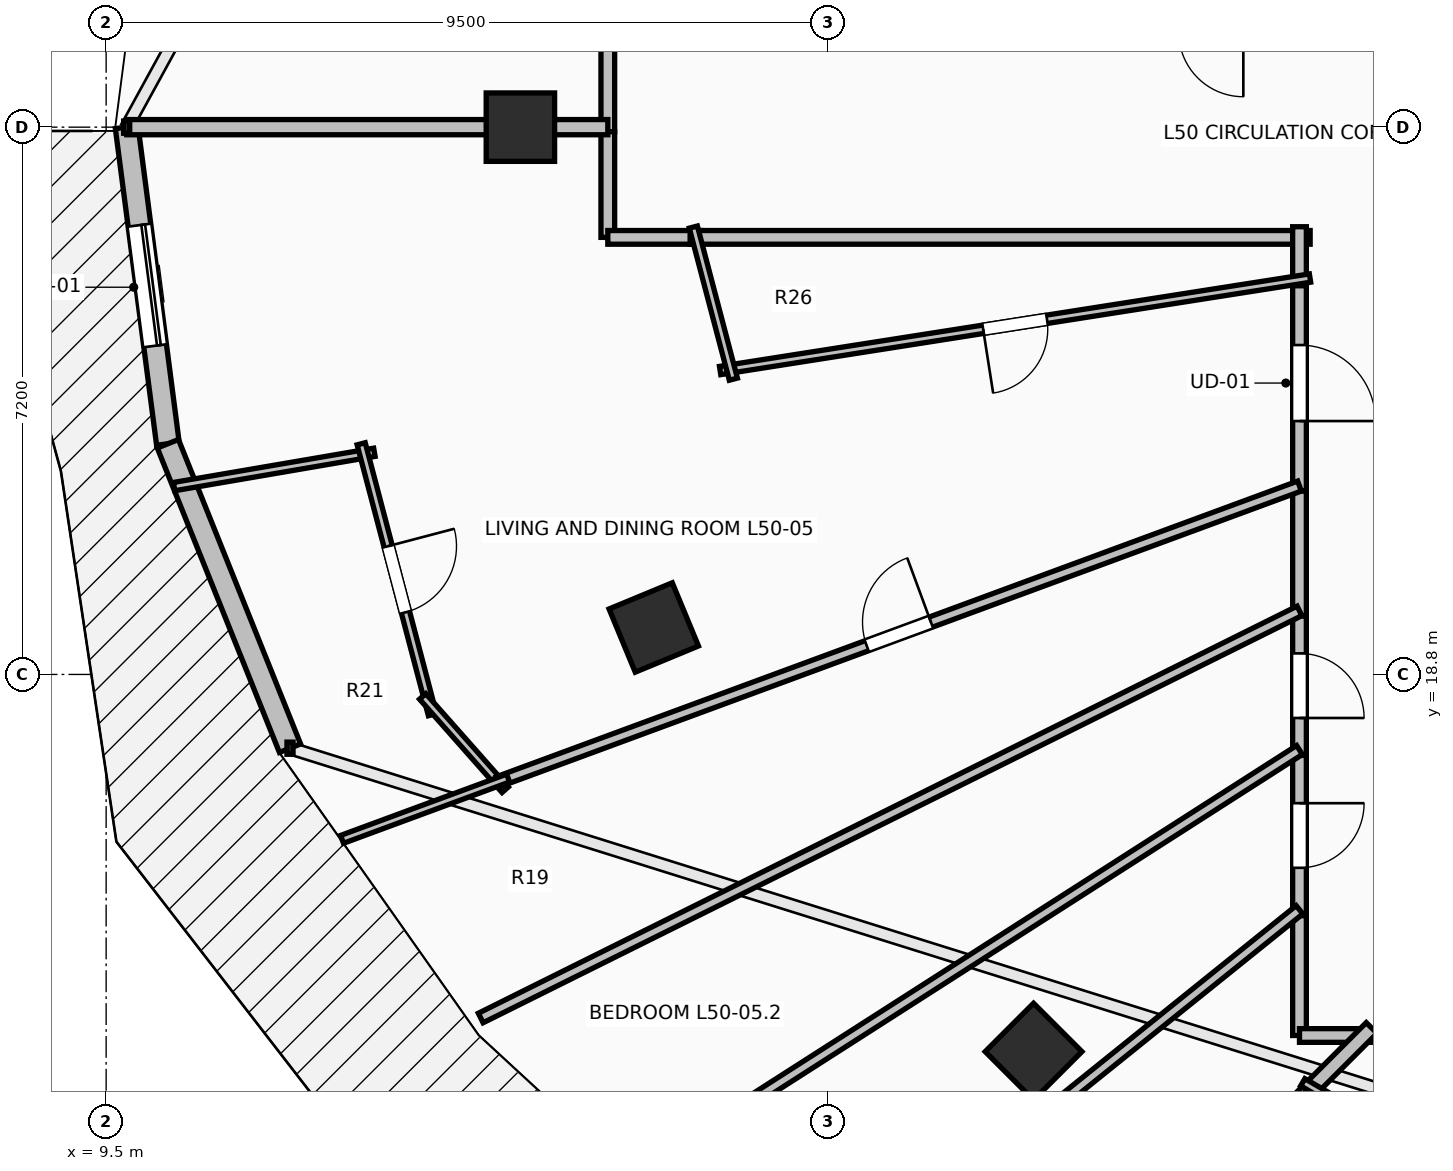
"""IFC4 building model, lengths in metres.
Left out: names, types, materials, properties, quantities, classifications, styles, units other than length and angle.
Written with IfcOpenShell. Run it as: python <this file> out.ifc"""

import sys

from ifc_helpers import new_model, si_unit, direction, frame, frame_2d, origin, origin_2d, place, context, subcontext, project, spatial, rectangle, extrude, element, fill, save


model = new_model("IFC4")
c1 = context("Model", 3, precision=1e-05, world=origin(), true_north=direction((0.0, 1.0)))
c2 = subcontext(c1, "Body", "Model", "MODEL_VIEW")
j1 = project(units=[si_unit("LENGTHUNIT", "METRE"), si_unit("PLANEANGLEUNIT", "RADIAN")], contexts=[c1])
p1 = place(None, origin())
s1 = spatial("IfcSite", under=j1, at=p1, CompositionType="ELEMENT")
p2 = place(p1, origin())
s2 = spatial("IfcBuilding", under=s1, at=p2, CompositionType="ELEMENT")
p3 = place(p2, frame((0.0, 0.0, 186.1)))
s3 = spatial("IfcBuildingStorey", under=s2, at=p3, CompositionType="ELEMENT", Elevation=186.1)
for number, where, z_axis, x_axis in (
    (1, (14.95, 26.0, 0.0), (0.0, 0.0, 1.0), (-1.0, 0.0, 0.0)),
    (2, (16.705, 19.418, 0.0), (0.0, 0.0, 1.0), (-0.924, -0.383, 0.0)),
    (3, (21.701, 13.838, 0.0), (0.0, 0.0, 1.0), (-0.707, -0.707, 0.0)),
):
    element("IfcColumn", number, at=place(p3, frame(where, z_axis=z_axis, x_axis=x_axis)), inside=s3, PredefinedType="COLUMN", context=c2, shape_type="SweptSolid", body=[
        extrude(rectangle(XDim=0.9, YDim=0.9, at=origin_2d()), origin(), (0.0, 0.0, 1.0), 3.5),
    ])
p4 = place(p3, frame((9.77, 26.0, 0.0), z_axis=(0.0, 0.0, 1.0), x_axis=(0.129147853268, -0.991625348605, 0.0)))
e4 = element("IfcWall", 4, at=p4, inside=s3, PredefinedType="STANDARD", context=c2, shape_type="SweptSolid", body=[
    extrude(rectangle(XDim=4.2, YDim=0.3, at=frame_2d((2.1, 0.0))), origin(), (0.0, 0.0, 1.0), 3.24),
])
p5 = place(p4, frame((1.3, 0.0, 0.0)))
e5 = element("IfcOpeningElement", 5, at=p5, cuts=e4, PredefinedType="OPENING", context=c2, shape_type="SweptSolid", body=[
    extrude(rectangle(XDim=1.6, YDim=2.3, at=frame_2d((0.8, 1.15))), frame((0.0, 0.165, 0.0), z_axis=(0.0, -1.0, 0.0), x_axis=(1.0, 0.0, 0.0)), (0.0, 0.0, 1.0), 0.33),
])
p6 = place(p3, frame((10.312, 21.835, 0.0), z_axis=(0.0, 0.0, 1.0), x_axis=(0.372268409848, -0.928125116043, 0.0)))
e6 = element("IfcWall", 6, at=p6, inside=s3, PredefinedType="STANDARD", context=c2, shape_type="SweptSolid", body=[
    extrude(rectangle(XDim=4.315, YDim=0.3, at=frame_2d((2.158, 0.0))), origin(), (0.0, 0.0, 1.0), 3.24),
])
p7 = place(p3, frame((16.1, 27.25, 0.0), z_axis=(0.0, 0.0, 1.0), x_axis=(0.0, -1.0, 0.0)))
e7 = element("IfcWall", 7, at=p7, inside=s3, PredefinedType="PARTITIONING", context=c2, shape_type="SweptSolid", body=[
    extrude(rectangle(XDim=1.31, YDim=0.18, at=frame_2d((0.655, 0.0))), origin(), (0.0, 0.0, 1.0), 2.432),
])
p8 = place(p3, frame((16.1, 25.94, 0.0), z_axis=(0.0, 0.0, 1.0), x_axis=(0.0, -1.0, 0.0)))
e8 = element("IfcWall", 8, at=p8, inside=s3, PredefinedType="PARTITIONING", context=c2, shape_type="SweptSolid", body=[
    extrude(rectangle(XDim=1.39, YDim=0.18, at=frame_2d((0.695, 0.0))), origin(), (0.0, 0.0, 1.0), 2.432),
])
p9 = place(p3, frame((16.1, 24.55, 0.0), z_axis=(0.0, 0.0, 1.0), x_axis=(1.0, 0.0, 0.0)))
e9 = element("IfcWall", 9, at=p9, inside=s3, PredefinedType="PARTITIONING", context=c2, shape_type="SweptSolid", body=[
    extrude(rectangle(XDim=1.223, YDim=0.18, at=frame_2d((0.611, 0.0))), origin(), (0.0, 0.0, 1.0), 3.24),
])
p10 = place(p3, frame((25.2, 24.053, 0.0), z_axis=(0.0, 0.0, 1.0), x_axis=(0.0, -1.0, 0.0)))
e10 = element("IfcWall", 10, at=p10, inside=s3, PredefinedType="PARTITIONING", context=c2, shape_type="SweptSolid", body=[
    extrude(rectangle(XDim=2.839, YDim=0.18, at=frame_2d((1.419, 0.0))), origin(), (0.0, 0.0, 1.0), 3.24),
])
p11 = place(p10, frame((0.919, 0.0, 0.0)))
e11 = element("IfcOpeningElement", 11, at=p11, cuts=e10, PredefinedType="OPENING", context=c2, shape_type="SweptSolid", body=[
    extrude(rectangle(XDim=1.0, YDim=2.15, at=frame_2d((0.5, 1.075))), frame((0.0, 0.105, 0.0), z_axis=(0.0, -1.0, 0.0), x_axis=(1.0, 0.0, 0.0)), (0.0, 0.0, 1.0), 0.21),
])
p12 = place(p3, frame((17.183, 24.55, 0.0), z_axis=(0.0, 0.0, 1.0), x_axis=(1.0, 0.0, 0.0)))
e12 = element("IfcWall", 12, at=p12, inside=s3, PredefinedType="PARTITIONING", context=c2, shape_type="SweptSolid", body=[
    extrude(rectangle(XDim=8.157, YDim=0.18, at=frame_2d((4.079, 0.0))), origin(), (0.0, 0.0, 1.0), 2.874),
])
p13 = place(p3, frame((25.2, 24.69, 0.0), z_axis=(0.0, 0.0, 1.0), x_axis=(0.0, -1.0, 0.0)))
e13 = element("IfcWall", 13, at=p13, inside=s3, PredefinedType="PARTITIONING", context=c2, shape_type="SweptSolid", body=[
    extrude(rectangle(XDim=0.777, YDim=0.18, at=frame_2d((0.388, 0.0))), origin(), (0.0, 0.0, 1.0), 3.24),
])
p14 = place(p3, frame((25.2, 21.214, 0.0), z_axis=(0.0, 0.0, 1.0), x_axis=(0.0, -1.0, 0.0)))
e14 = element("IfcWall", 14, at=p14, inside=s3, PredefinedType="PARTITIONING", context=c2, shape_type="SweptSolid", body=[
    extrude(rectangle(XDim=1.645, YDim=0.18, at=frame_2d((0.823, 0.0))), origin(), (0.0, 0.0, 1.0), 3.24),
])
p15 = place(p3, frame((25.2, 19.569, 0.0), z_axis=(0.0, 0.0, 1.0), x_axis=(0.0, -1.0, 0.0)))
e15 = element("IfcWall", 15, at=p15, inside=s3, PredefinedType="PARTITIONING", context=c2, shape_type="SweptSolid", body=[
    extrude(rectangle(XDim=1.834, YDim=0.18, at=frame_2d((0.917, 0.0))), origin(), (0.0, 0.0, 1.0), 3.24),
])
p16 = place(p15, frame((0.492, 0.0, 0.0)))
e16 = element("IfcOpeningElement", 16, at=p16, cuts=e15, PredefinedType="OPENING", context=c2, shape_type="SweptSolid", body=[
    extrude(rectangle(XDim=0.85, YDim=2.1, at=frame_2d((0.425, 1.05))), frame((0.0, 0.105, 0.0), z_axis=(0.0, -1.0, 0.0), x_axis=(1.0, 0.0, 0.0)), (0.0, 0.0, 1.0), 0.21),
])
p17 = place(p3, frame((25.2, 17.735, 0.0), z_axis=(0.0, 0.0, 1.0), x_axis=(0.0, -1.0, 0.0)))
e17 = element("IfcWall", 17, at=p17, inside=s3, PredefinedType="PARTITIONING", context=c2, shape_type="SweptSolid", body=[
    extrude(rectangle(XDim=2.108, YDim=0.18, at=frame_2d((1.054, 0.0))), origin(), (0.0, 0.0, 1.0), 2.432),
])
p18 = place(p17, frame((0.629, 0.0, 0.0)))
e18 = element("IfcOpeningElement", 18, at=p18, cuts=e17, PredefinedType="OPENING", context=c2, shape_type="SweptSolid", body=[
    extrude(rectangle(XDim=0.85, YDim=2.1, at=frame_2d((0.425, 1.05))), frame((0.0, 0.105, 0.0), z_axis=(0.0, -1.0, 0.0), x_axis=(1.0, 0.0, 0.0)), (0.0, 0.0, 1.0), 0.21),
])
p19 = place(p3, frame((25.2, 15.627, 0.0), z_axis=(0.0, 0.0, 1.0), x_axis=(0.0, -1.0, 0.0)))
e19 = element("IfcWall", 19, at=p19, inside=s3, PredefinedType="PARTITIONING", context=c2, shape_type="SweptSolid", body=[
    extrude(rectangle(XDim=1.577, YDim=0.18, at=frame_2d((0.789, 0.0))), origin(), (0.0, 0.0, 1.0), 2.432),
])
p20 = place(p3, frame((25.2, 14.05, 0.0), z_axis=(0.0, 0.0, 1.0), x_axis=(1.0, 0.0, 0.0)))
e20 = element("IfcWall", 20, at=p20, inside=s3, PredefinedType="PARTITIONING", context=c2, shape_type="SweptSolid", body=[
    extrude(rectangle(XDim=0.91, YDim=0.18, at=frame_2d((0.455, 0.0))), origin(), (0.0, 0.0, 1.0), 2.874),
])
p21 = place(p3, frame((25.97, 14.05, 0.0), z_axis=(0.0, 0.0, 1.0), x_axis=(1.0, 0.0, 0.0)))
e21 = element("IfcWall", 21, at=p21, inside=s3, PredefinedType="PARTITIONING", context=c2, shape_type="SweptSolid", body=[
    extrude(rectangle(XDim=3.385, YDim=0.18, at=frame_2d((1.692, 0.0))), origin(), (0.0, 0.0, 1.0), 2.432),
])
p22 = place(p3, frame((9.771, 26.0, 0.0), z_axis=(0.0, 0.0, 1.0), x_axis=(1.0, 0.0, 0.0)))
e22 = element("IfcWall", 22, at=p22, inside=s3, PredefinedType="PARTITIONING", context=c2, shape_type="SweptSolid", body=[
    extrude(rectangle(XDim=6.329, YDim=0.2, at=frame_2d((3.165, 0.0))), origin(), (0.0, 0.0, 1.0), 2.432),
])
p23 = place(p3, frame((25.338, 24.015, 0.0), z_axis=(0.0, 0.0, 1.0), x_axis=(-0.987940229144, -0.154835731144, 0.0)))
e23 = element("IfcWall", 23, at=p23, inside=s3, PredefinedType="PARTITIONING", context=c2, shape_type="SweptSolid", body=[
    extrude(rectangle(XDim=7.855, YDim=0.11, at=frame_2d((3.928, 0.0))), origin(), (0.0, 0.0, 1.0), 2.874),
])
p24 = place(p23, frame((3.503, 0.0, 0.0)))
e24 = element("IfcOpeningElement", 24, at=p24, cuts=e23, PredefinedType="OPENING", context=c2, shape_type="SweptSolid", body=[
    extrude(rectangle(XDim=0.85, YDim=2.1, at=frame_2d((0.425, 1.05))), frame((0.0, 0.07, 0.0), z_axis=(0.0, -1.0, 0.0), x_axis=(1.0, 0.0, 0.0)), (0.0, 0.0, 1.0), 0.14),
])
p25 = place(p3, frame((17.752, 22.685, 0.0), z_axis=(0.0, 0.0, 1.0), x_axis=(-0.254429402158, 0.967091350038, 0.0)))
e25 = element("IfcWall", 25, at=p25, inside=s3, PredefinedType="PARTITIONING", context=c2, shape_type="SweptSolid", body=[
    extrude(rectangle(XDim=2.069, YDim=0.11, at=frame_2d((1.034, 0.0))), origin(), (0.0, 0.0, 1.0), 3.24),
])
p26 = place(p3, frame((10.394, 21.271, 0.0), z_axis=(0.0, 0.0, 1.0), x_axis=(0.985656128296, 0.168766100722, 0.0)))
e26 = element("IfcWall", 26, at=p26, inside=s3, PredefinedType="PARTITIONING", context=c2, shape_type="SweptSolid", body=[
    extrude(rectangle(XDim=2.673, YDim=0.11, at=frame_2d((1.337, 0.0))), origin(), (0.0, 0.0, 1.0), 3.24),
])
p27 = place(p3, frame((12.855, 21.834, 0.0), z_axis=(0.0, 0.0, 1.0), x_axis=(0.254271540361, -0.967132867688, 0.0)))
e27 = element("IfcWall", 27, at=p27, inside=s3, PredefinedType="PARTITIONING", context=c2, shape_type="SweptSolid", body=[
    extrude(rectangle(XDim=3.685, YDim=0.11, at=frame_2d((1.843, 0.0))), origin(), (0.0, 0.0, 1.0), 3.24),
])
p28 = place(p27, frame((1.393, 0.0, 0.0)))
e28 = element("IfcOpeningElement", 28, at=p28, cuts=e27, PredefinedType="OPENING", context=c2, shape_type="SweptSolid", body=[
    extrude(rectangle(XDim=0.9, YDim=2.1, at=frame_2d((0.45, 1.05))), frame((0.0, 0.07, 0.0), z_axis=(0.0, -1.0, 0.0), x_axis=(1.0, 0.0, 0.0)), (0.0, 0.0, 1.0), 0.14),
])
p29 = place(p3, frame((13.664, 18.511, 0.0), z_axis=(0.0, 0.0, 1.0), x_axis=(0.662345628205, -0.749198417509, 0.0)))
e29 = element("IfcWall", 29, at=p29, inside=s3, PredefinedType="PARTITIONING", context=c2, shape_type="SweptSolid", body=[
    extrude(rectangle(XDim=1.639, YDim=0.11, at=frame_2d((0.819, 0.0))), origin(), (0.0, 0.0, 1.0), 3.24),
])
p30 = place(p3, frame((14.657, 17.388, 0.0), z_axis=(0.0, 0.0, 1.0), x_axis=(0.938173124492, 0.346166417322, 0.0)))
e30 = element("IfcWall", 30, at=p30, inside=s3, PredefinedType="PARTITIONING", context=c2, shape_type="SweptSolid", body=[
    extrude(rectangle(XDim=11.238, YDim=0.14, at=frame_2d((5.619, 0.0))), origin(), (0.0, 0.0, 1.0), 2.432),
])
p31 = place(p30, frame((5.169, 0.0, 0.0)))
e31 = element("IfcOpeningElement", 31, at=p31, cuts=e30, PredefinedType="OPENING", context=c2, shape_type="SweptSolid", body=[
    extrude(rectangle(XDim=0.9, YDim=2.1, at=frame_2d((0.45, 1.05))), frame((0.0, 0.085, 0.0), z_axis=(0.0, -1.0, 0.0), x_axis=(1.0, 0.0, 0.0)), (0.0, 0.0, 1.0), 0.17),
])
p32 = place(p3, frame((12.604, 16.631, 0.0), z_axis=(0.0, 0.0, 1.0), x_axis=(0.938194450562, 0.346108614361, 0.0)))
e32 = element("IfcWall", 32, at=p32, inside=s3, PredefinedType="PARTITIONING", context=c2, shape_type="SweptSolid", body=[
    extrude(rectangle(XDim=2.328, YDim=0.11, at=frame_2d((1.164, 0.0))), origin(), (0.0, 0.0, 1.0), 3.24),
])
p33 = place(p3, frame((14.428, 14.28, 0.0), z_axis=(0.0, 0.0, 1.0), x_axis=(0.895423439435, 0.44521552546, 0.0)))
e33 = element("IfcWall", 33, at=p33, inside=s3, PredefinedType="PARTITIONING", context=c2, shape_type="SweptSolid", body=[
    extrude(rectangle(XDim=12.03, YDim=0.14, at=frame_2d((6.015, 0.0))), origin(), (0.0, 0.0, 1.0), 2.432),
])
p34 = place(p3, frame((16.555, 12.272, 0.0), z_axis=(0.0, 0.0, 1.0), x_axis=(0.842221721565, 0.539131312135, 0.0)))
e34 = element("IfcWall", 34, at=p34, inside=s3, PredefinedType="PARTITIONING", context=c2, shape_type="SweptSolid", body=[
    extrude(rectangle(XDim=10.265, YDim=0.14, at=frame_2d((5.132, 0.0))), origin(), (0.0, 0.0, 1.0), 2.432),
])
p35 = place(p3, frame((18.715, 10.487, 0.0), z_axis=(0.0, 0.0, 1.0), x_axis=(0.779157389419, 0.626828335762, 0.0)))
e35 = element("IfcWall", 35, at=p35, inside=s3, PredefinedType="PARTITIONING", context=c2, shape_type="SweptSolid", body=[
    extrude(rectangle(XDim=8.323, YDim=0.14, at=frame_2d((4.162, 0.0))), origin(), (0.0, 0.0, 1.0), 2.432),
])
p36 = place(p35, frame((2.896, 0.0, 0.0)))
e36 = element("IfcOpeningElement", 36, at=p36, cuts=e35, PredefinedType="OPENING", context=c2, shape_type="SweptSolid", body=[
    extrude(rectangle(XDim=0.85, YDim=2.1, at=frame_2d((0.425, 1.05))), frame((0.0, 0.085, 0.0), z_axis=(0.0, -1.0, 0.0), x_axis=(1.0, 0.0, 0.0)), (0.0, 0.0, 1.0), 0.17),
])
p37 = place(p3, frame((21.041, 9.041, 0.0), z_axis=(0.0, 0.0, 1.0), x_axis=(0.707106781187, 0.707106781187, 0.0)))
e37 = element("IfcWall", 37, at=p37, inside=s3, PredefinedType="PARTITIONING", context=c2, shape_type="SweptSolid", body=[
    extrude(rectangle(XDim=6.176, YDim=0.2, at=frame_2d((3.088, 0.0))), origin(), (0.0, 0.0, 1.0), 2.774),
])
p38 = place(p3, frame((25.309, 13.309, 0.0), z_axis=(0.0, 0.0, 1.0), x_axis=(0.707106781187, 0.707106781187, 0.0)))
e38 = element("IfcWall", 38, at=p38, inside=s3, PredefinedType="PARTITIONING", context=c2, shape_type="SweptSolid", body=[
    extrude(rectangle(XDim=1.188, YDim=0.2, at=frame_2d((0.594, 0.0))), origin(), (0.0, 0.0, 1.0), 2.874),
])
p39 = place(p3, frame((27.568, 12.083, 0.0), z_axis=(0.0, 0.0, 1.0), x_axis=(-0.864515441931, 0.502606258082, 0.0)))
e39 = element("IfcWall", 39, at=p39, inside=s3, PredefinedType="PARTITIONING", context=c2, shape_type="SweptSolid", body=[
    extrude(rectangle(XDim=2.69, YDim=0.11, at=frame_2d((1.345, 0.0))), origin(), (0.0, 0.0, 1.0), 3.24),
])
p40 = place(p5, origin())
e40 = element("IfcDoor", 40, at=p40, inside=s3, OperationType="SLIDING_TO_LEFT", PredefinedType="DOOR", context=c2, shape_type="SweptSolid", body=[
    extrude(rectangle(XDim=1.6, YDim=2.3, at=frame_2d((0.8, 1.15))), frame((0.0, 0.025, 0.0), z_axis=(0.0, -1.0, 0.0), x_axis=(1.0, 0.0, 0.0)), (0.0, 0.0, 1.0), 0.05),
])
fill(e5, e40)
p41 = place(p11, origin())
e41 = element("IfcDoor", 41, at=p41, inside=s3, OperationType="SINGLE_SWING_RIGHT", PredefinedType="DOOR", context=c2, shape_type="SweptSolid", body=[
    extrude(rectangle(XDim=1.0, YDim=2.15, at=frame_2d((0.5, 1.075))), frame((0.0, 0.025, 0.0), z_axis=(0.0, -1.0, 0.0), x_axis=(1.0, 0.0, 0.0)), (0.0, 0.0, 1.0), 0.05),
])
fill(e11, e41)
p42 = place(p24, origin())
e42 = element("IfcDoor", 42, at=p42, inside=s3, OperationType="SINGLE_SWING_RIGHT", PredefinedType="DOOR", context=c2, shape_type="SweptSolid", body=[
    extrude(rectangle(XDim=0.85, YDim=2.1, at=frame_2d((0.425, 1.05))), frame((0.0, 0.025, 0.0), z_axis=(0.0, -1.0, 0.0), x_axis=(1.0, 0.0, 0.0)), (0.0, 0.0, 1.0), 0.05),
])
fill(e24, e42)
p43 = place(p28, origin())
e43 = element("IfcDoor", 43, at=p43, inside=s3, OperationType="SINGLE_SWING_LEFT", PredefinedType="DOOR", context=c2, shape_type="SweptSolid", body=[
    extrude(rectangle(XDim=0.9, YDim=2.1, at=frame_2d((0.45, 1.05))), frame((0.0, 0.025, 0.0), z_axis=(0.0, -1.0, 0.0), x_axis=(1.0, 0.0, 0.0)), (0.0, 0.0, 1.0), 0.05),
])
fill(e28, e43)
p44 = place(p31, origin())
e44 = element("IfcDoor", 44, at=p44, inside=s3, OperationType="SINGLE_SWING_RIGHT", PredefinedType="DOOR", context=c2, shape_type="SweptSolid", body=[
    extrude(rectangle(XDim=0.9, YDim=2.1, at=frame_2d((0.45, 1.05))), frame((0.0, 0.025, 0.0), z_axis=(0.0, -1.0, 0.0), x_axis=(1.0, 0.0, 0.0)), (0.0, 0.0, 1.0), 0.05),
])
fill(e31, e44)
p45 = place(p16, origin())
e45 = element("IfcDoor", 45, at=p45, inside=s3, OperationType="SINGLE_SWING_RIGHT", PredefinedType="DOOR", context=c2, shape_type="SweptSolid", body=[
    extrude(rectangle(XDim=0.85, YDim=2.1, at=frame_2d((0.425, 1.05))), frame((0.0, 0.025, 0.0), z_axis=(0.0, -1.0, 0.0), x_axis=(1.0, 0.0, 0.0)), (0.0, 0.0, 1.0), 0.05),
])
fill(e16, e45)
p46 = place(p18, origin())
e46 = element("IfcDoor", 46, at=p46, inside=s3, OperationType="SINGLE_SWING_LEFT", PredefinedType="DOOR", context=c2, shape_type="SweptSolid", body=[
    extrude(rectangle(XDim=0.85, YDim=2.1, at=frame_2d((0.425, 1.05))), frame((0.0, 0.025, 0.0), z_axis=(0.0, -1.0, 0.0), x_axis=(1.0, 0.0, 0.0)), (0.0, 0.0, 1.0), 0.05),
])
fill(e18, e46)
save(model, sys.argv[1])
